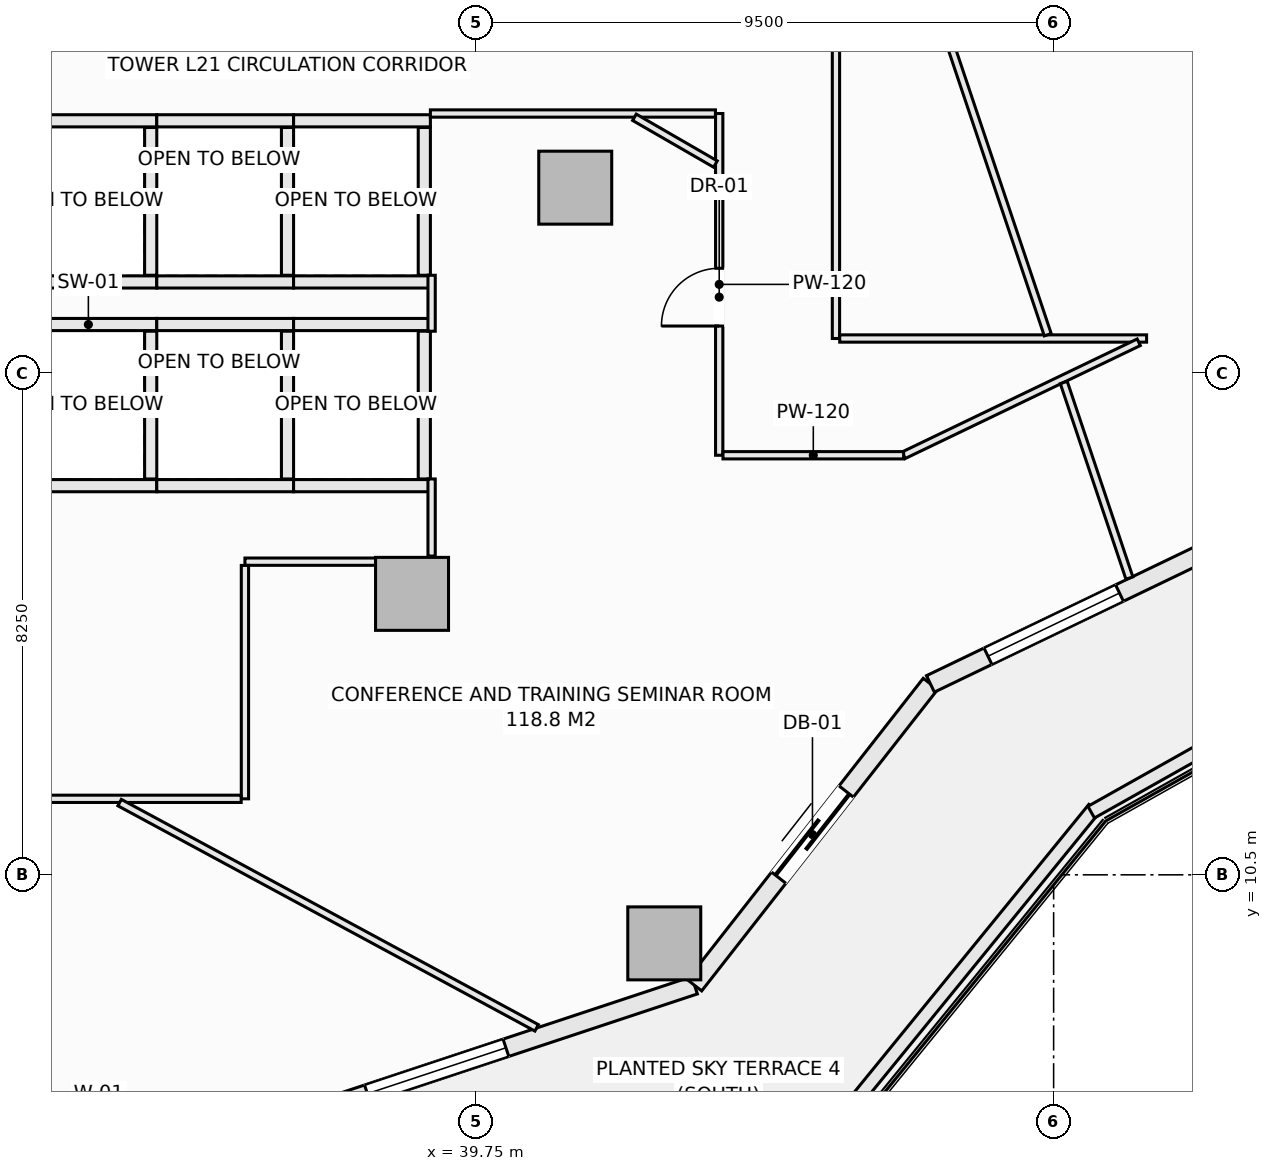
"""IFC4 building model, lengths in metres.
Left out: names, types, materials, properties, quantities, classifications, styles, units other than length and angle.
Written with IfcOpenShell. Run it as: python <this file> out.ifc"""

import sys

from ifc_helpers import new_model, si_unit, direction, frame, frame_2d, origin, origin_2d, place, context, subcontext, project, spatial, rectangle, extrude, element, fill, save


model = new_model("IFC4")
c1 = context("Model", 3, precision=1e-05, world=origin(), true_north=direction((0.0, 1.0)))
c2 = subcontext(c1, "Body", "Model", "MODEL_VIEW")
j1 = project(units=[si_unit("LENGTHUNIT", "METRE"), si_unit("PLANEANGLEUNIT", "RADIAN")], contexts=[c1])
p1 = place(None, origin())
s1 = spatial("IfcSite", under=j1, at=p1, CompositionType="ELEMENT")
p2 = place(p1, origin())
s2 = spatial("IfcBuilding", under=s1, at=p2, CompositionType="ELEMENT")
p3 = place(p2, frame((0.0, 0.0, 88.1)))
s3 = spatial("IfcBuildingStorey", under=s2, at=p3, CompositionType="ELEMENT", Elevation=88.1)
for number, where, z_axis, x_axis in (
    (1, (42.846, 9.373, -0.28), (0.0, 0.0, 1.0), (1.0, 0.0, 0.0)),
    (2, (38.698, 15.121, -0.28), (0.0, 0.0, 1.0), (1.0, 0.0, 0.0)),
    (3, (41.382, 21.801, -0.28), (0.0, 0.0, 1.0), (1.0, 0.0, 0.0)),
):
    element("IfcColumn", number, at=place(p3, frame(where, z_axis=z_axis, x_axis=x_axis)), inside=s3, PredefinedType="COLUMN", context=c2, shape_type="SweptSolid", body=[
        extrude(rectangle(XDim=1.2, YDim=1.2, at=origin_2d()), origin(), (0.0, 0.0, 1.0), 3.85),
    ])
p4 = place(p3, frame((36.968, 6.571, 0.0), z_axis=(0.0, 0.0, 1.0), x_axis=(0.949245153629, 0.314537181127, 0.0)))
e4 = element("IfcWall", 4, at=p4, inside=s3, PredefinedType="SOLIDWALL", context=c2, shape_type="SweptSolid", body=[
    extrude(rectangle(XDim=6.717, YDim=0.3, at=frame_2d((3.358, 0.0))), origin(), (0.0, 0.0, 1.0), 3.093),
])
p5 = place(p4, frame((1.05, 0.0, 0.85)))
e5 = element("IfcOpeningElement", 5, at=p5, cuts=e4, PredefinedType="OPENING", context=c2, shape_type="SweptSolid", body=[
    extrude(rectangle(XDim=2.4, YDim=1.9, at=frame_2d((1.2, 0.95))), frame((0.0, 0.16, 0.0), z_axis=(0.0, -1.0, 0.0), x_axis=(1.0, 0.0, 0.0)), (0.0, 0.0, 1.0), 0.32),
])
p6 = place(p3, frame((43.344, 8.684, 0.0), z_axis=(0.0, 0.0, 1.0), x_axis=(0.616434798832, 0.78740595552, 0.0)))
e6 = element("IfcWall", 6, at=p6, inside=s3, PredefinedType="SOLIDWALL", context=c2, shape_type="SweptSolid", body=[
    extrude(rectangle(XDim=6.294, YDim=0.3, at=frame_2d((3.147, 0.0))), origin(), (0.0, 0.0, 1.0), 3.093),
])
p7 = place(p6, frame((2.247, 0.0, 0.0)))
e7 = element("IfcOpeningElement", 7, at=p7, cuts=e6, PredefinedType="OPENING", context=c2, shape_type="SweptSolid", body=[
    extrude(rectangle(XDim=1.8, YDim=2.25, at=frame_2d((0.9, 1.125))), frame((0.0, 0.16, 0.0), z_axis=(0.0, -1.0, 0.0), x_axis=(1.0, 0.0, 0.0)), (0.0, 0.0, 1.0), 0.32),
])
p8 = place(p3, frame((47.224, 13.64, 0.0), z_axis=(0.0, 0.0, 1.0), x_axis=(0.901354747727, 0.433081538224, 0.0)))
e8 = element("IfcWall", 8, at=p8, inside=s3, PredefinedType="SOLIDWALL", context=c2, shape_type="SweptSolid", body=[
    extrude(rectangle(XDim=6.431, YDim=0.3, at=frame_2d((3.215, 0.0))), origin(), (0.0, 0.0, 1.0), 3.093),
])
p9 = place(p8, frame((1.05, 0.0, 0.85)))
e9 = element("IfcOpeningElement", 9, at=p9, cuts=e8, PredefinedType="OPENING", context=c2, shape_type="SweptSolid", body=[
    extrude(rectangle(XDim=2.4, YDim=1.9, at=frame_2d((1.2, 0.95))), frame((0.0, 0.16, 0.0), z_axis=(0.0, -1.0, 0.0), x_axis=(1.0, 0.0, 0.0)), (0.0, 0.0, 1.0), 0.32),
])
p10 = place(p3, frame((45.292, 5.918, 0.0), z_axis=(0.0, 0.0, 1.0), x_axis=(0.631819273026, 0.775115737315, 0.0)))
e10 = element("IfcWall", 10, at=p10, inside=s3, PredefinedType="PARAPET", context=c2, shape_type="SweptSolid", body=[
    extrude(rectangle(XDim=7.316, YDim=0.22, at=frame_2d((3.658, 0.0))), origin(), (0.0, 0.0, 1.0), 0.52),
])
p11 = place(p3, frame((49.868, 11.531, 0.0), z_axis=(0.0, 0.0, 1.0), x_axis=(0.871775109335, 0.489906275468, 0.0)))
e11 = element("IfcWall", 11, at=p11, inside=s3, PredefinedType="PARAPET", context=c2, shape_type="SweptSolid", body=[
    extrude(rectangle(XDim=7.152, YDim=0.22, at=frame_2d((3.576, 0.0))), origin(), (0.0, 0.0, 1.0), 0.52),
])
for number, where, z_axis, x_axis in (
    (12, (32.25, 19.55, 0.0), (0.0, 0.0, 1.0), (1.0, 0.0, 0.0)),
    (13, (32.25, 16.9, 0.0), (0.0, 0.0, 1.0), (1.0, 0.0, 0.0)),
):
    element("IfcWall", number, at=place(p3, frame(where, z_axis=z_axis, x_axis=x_axis)), inside=s3, PredefinedType="SOLIDWALL", context=c2, shape_type="SweptSolid", body=[
        extrude(rectangle(XDim=2.25, YDim=0.2, at=frame_2d((1.125, 0.0))), origin(), (0.0, 0.0, 1.0), 3.57),
    ])
p12 = place(p3, frame((34.4, 17.01, 0.0), z_axis=(0.0, 0.0, 1.0), x_axis=(0.0, 1.0, 0.0)))
e14 = element("IfcWall", 14, at=p12, inside=s3, PredefinedType="SOLIDWALL", context=c2, shape_type="SweptSolid", body=[
    extrude(rectangle(XDim=2.43, YDim=0.2, at=frame_2d((1.215, 0.0))), origin(), (0.0, 0.0, 1.0), 3.57),
])
for number, where, z_axis, x_axis in (
    (15, (34.5, 19.55, 0.0), (0.0, 0.0, 1.0), (1.0, 0.0, 0.0)),
    (16, (34.5, 16.9, 0.0), (0.0, 0.0, 1.0), (1.0, 0.0, 0.0)),
):
    element("IfcWall", number, at=place(p3, frame(where, z_axis=z_axis, x_axis=x_axis)), inside=s3, PredefinedType="SOLIDWALL", context=c2, shape_type="SweptSolid", body=[
        extrude(rectangle(XDim=2.25, YDim=0.2, at=frame_2d((1.125, 0.0))), origin(), (0.0, 0.0, 1.0), 3.57),
    ])
p13 = place(p3, frame((36.65, 17.01, 0.0), z_axis=(0.0, 0.0, 1.0), x_axis=(0.0, 1.0, 0.0)))
e17 = element("IfcWall", 17, at=p13, inside=s3, PredefinedType="SOLIDWALL", context=c2, shape_type="SweptSolid", body=[
    extrude(rectangle(XDim=2.43, YDim=0.2, at=frame_2d((1.215, 0.0))), origin(), (0.0, 0.0, 1.0), 3.57),
])
for number, where, z_axis, x_axis in (
    (18, (36.75, 19.55, 0.0), (0.0, 0.0, 1.0), (1.0, 0.0, 0.0)),
    (19, (36.75, 16.9, 0.0), (0.0, 0.0, 1.0), (1.0, 0.0, 0.0)),
):
    element("IfcWall", number, at=place(p3, frame(where, z_axis=z_axis, x_axis=x_axis)), inside=s3, PredefinedType="SOLIDWALL", context=c2, shape_type="SweptSolid", body=[
        extrude(rectangle(XDim=2.25, YDim=0.2, at=frame_2d((1.125, 0.0))), origin(), (0.0, 0.0, 1.0), 3.57),
    ])
p14 = place(p3, frame((38.9, 17.01, 0.0), z_axis=(0.0, 0.0, 1.0), x_axis=(0.0, 1.0, 0.0)))
e20 = element("IfcWall", 20, at=p14, inside=s3, PredefinedType="SOLIDWALL", context=c2, shape_type="SweptSolid", body=[
    extrude(rectangle(XDim=2.43, YDim=0.2, at=frame_2d((1.215, 0.0))), origin(), (0.0, 0.0, 1.0), 3.57),
])
for number, where, z_axis, x_axis in (
    (21, (32.25, 22.9, 0.0), (0.0, 0.0, 1.0), (1.0, 0.0, 0.0)),
    (22, (32.25, 20.25, 0.0), (0.0, 0.0, 1.0), (1.0, 0.0, 0.0)),
):
    element("IfcWall", number, at=place(p3, frame(where, z_axis=z_axis, x_axis=x_axis)), inside=s3, PredefinedType="SOLIDWALL", context=c2, shape_type="SweptSolid", body=[
        extrude(rectangle(XDim=2.25, YDim=0.2, at=frame_2d((1.125, 0.0))), origin(), (0.0, 0.0, 1.0), 3.57),
    ])
p15 = place(p3, frame((34.4, 20.36, 0.0), z_axis=(0.0, 0.0, 1.0), x_axis=(0.0, 1.0, 0.0)))
e23 = element("IfcWall", 23, at=p15, inside=s3, PredefinedType="SOLIDWALL", context=c2, shape_type="SweptSolid", body=[
    extrude(rectangle(XDim=2.43, YDim=0.2, at=frame_2d((1.215, 0.0))), origin(), (0.0, 0.0, 1.0), 3.57),
])
for number, where, z_axis, x_axis in (
    (24, (34.5, 22.9, 0.0), (0.0, 0.0, 1.0), (1.0, 0.0, 0.0)),
    (25, (34.5, 20.25, 0.0), (0.0, 0.0, 1.0), (1.0, 0.0, 0.0)),
):
    element("IfcWall", number, at=place(p3, frame(where, z_axis=z_axis, x_axis=x_axis)), inside=s3, PredefinedType="SOLIDWALL", context=c2, shape_type="SweptSolid", body=[
        extrude(rectangle(XDim=2.25, YDim=0.2, at=frame_2d((1.125, 0.0))), origin(), (0.0, 0.0, 1.0), 3.57),
    ])
p16 = place(p3, frame((36.65, 20.36, 0.0), z_axis=(0.0, 0.0, 1.0), x_axis=(0.0, 1.0, 0.0)))
e26 = element("IfcWall", 26, at=p16, inside=s3, PredefinedType="SOLIDWALL", context=c2, shape_type="SweptSolid", body=[
    extrude(rectangle(XDim=2.43, YDim=0.2, at=frame_2d((1.215, 0.0))), origin(), (0.0, 0.0, 1.0), 3.57),
])
for number, where, z_axis, x_axis in (
    (27, (36.75, 22.9, 0.0), (0.0, 0.0, 1.0), (1.0, 0.0, 0.0)),
    (28, (36.75, 20.25, 0.0), (0.0, 0.0, 1.0), (1.0, 0.0, 0.0)),
):
    element("IfcWall", number, at=place(p3, frame(where, z_axis=z_axis, x_axis=x_axis)), inside=s3, PredefinedType="SOLIDWALL", context=c2, shape_type="SweptSolid", body=[
        extrude(rectangle(XDim=2.25, YDim=0.2, at=frame_2d((1.125, 0.0))), origin(), (0.0, 0.0, 1.0), 3.57),
    ])
p17 = place(p3, frame((38.9, 20.36, 0.0), z_axis=(0.0, 0.0, 1.0), x_axis=(0.0, 1.0, 0.0)))
e29 = element("IfcWall", 29, at=p17, inside=s3, PredefinedType="SOLIDWALL", context=c2, shape_type="SweptSolid", body=[
    extrude(rectangle(XDim=2.43, YDim=0.2, at=frame_2d((1.215, 0.0))), origin(), (0.0, 0.0, 1.0), 3.57),
])
p18 = place(p3, frame((35.95, 15.65, 0.0), z_axis=(0.0, 0.0, 1.0), x_axis=(1.0, 0.0, 0.0)))
e30 = element("IfcWall", 30, at=p18, inside=s3, PredefinedType="PARTITIONING", context=c2, shape_type="SweptSolid", body=[
    extrude(rectangle(XDim=2.291, YDim=0.12, at=frame_2d((1.146, 0.0))), origin(), (0.0, 0.0, 1.0), 3.57),
])
p19 = place(p3, frame((35.95, 11.75, 0.0), z_axis=(0.0, 0.0, 1.0), x_axis=(0.0, 1.0, 0.0)))
e31 = element("IfcWall", 31, at=p19, inside=s3, PredefinedType="PARTITIONING", context=c2, shape_type="SweptSolid", body=[
    extrude(rectangle(XDim=3.838, YDim=0.12, at=frame_2d((1.919, 0.0))), origin(), (0.0, 0.0, 1.0), 3.57),
])
p20 = place(p3, frame((27.242, 11.75, 0.0), z_axis=(0.0, 0.0, 1.0), x_axis=(1.0, 0.0, 0.0)))
e32 = element("IfcWall", 32, at=p20, inside=s3, PredefinedType="PARTITIONING", context=c2, shape_type="SweptSolid", body=[
    extrude(rectangle(XDim=8.646, YDim=0.12, at=frame_2d((4.323, 0.0))), origin(), (0.0, 0.0, 1.0), 3.57),
])
p21 = place(p20, frame((3.186, 0.0, 0.0)))
e33 = element("IfcOpeningElement", 33, at=p21, cuts=e32, PredefinedType="OPENING", context=c2, shape_type="SweptSolid", body=[
    extrude(rectangle(XDim=0.95, YDim=2.1, at=frame_2d((0.475, 1.05))), frame((0.0, 0.07, 0.0), z_axis=(0.0, -1.0, 0.0), x_axis=(1.0, 0.0, 0.0)), (0.0, 0.0, 1.0), 0.14),
])
p22 = place(p3, frame((43.75, 17.4, 0.0), z_axis=(0.0, 0.0, 1.0), x_axis=(0.0, 1.0, 0.0)))
e34 = element("IfcWall", 34, at=p22, inside=s3, PredefinedType="PARTITIONING", context=c2, shape_type="SweptSolid", body=[
    extrude(rectangle(XDim=5.62, YDim=0.12, at=frame_2d((2.81, 0.0))), origin(), (0.0, 0.0, 1.0), 3.57),
])
p23 = place(p22, frame((2.125, 0.0, 0.0)))
e35 = element("IfcOpeningElement", 35, at=p23, cuts=e34, PredefinedType="OPENING", context=c2, shape_type="SweptSolid", body=[
    extrude(rectangle(XDim=0.95, YDim=2.1, at=frame_2d((0.475, 1.05))), frame((0.0, 0.07, 0.0), z_axis=(0.0, -1.0, 0.0), x_axis=(1.0, 0.0, 0.0)), (0.0, 0.0, 1.0), 0.14),
])
p24 = place(p3, frame((45.67, 19.32, 0.0), z_axis=(0.0, 0.0, 1.0), x_axis=(0.0, 1.0, 0.0)))
e36 = element("IfcWall", 36, at=p24, inside=s3, PredefinedType="PARTITIONING", context=c2, shape_type="SweptSolid", body=[
    extrude(rectangle(XDim=14.798, YDim=0.12, at=frame_2d((7.399, 0.0))), origin(), (0.0, 0.0, 1.0), 3.57),
])
p25 = place(p24, frame((11.458, 0.0, 0.0)))
e37 = element("IfcOpeningElement", 37, at=p25, cuts=e36, PredefinedType="OPENING", context=c2, shape_type="SweptSolid", body=[
    extrude(rectangle(XDim=0.95, YDim=2.1, at=frame_2d((0.475, 1.05))), frame((0.0, 0.07, 0.0), z_axis=(0.0, -1.0, 0.0), x_axis=(1.0, 0.0, 0.0)), (0.0, 0.0, 1.0), 0.14),
])
p26 = place(p3, frame((45.732, 19.32, 0.0), z_axis=(0.0, 0.0, 1.0), x_axis=(1.0, 0.0, 0.0)))
e38 = element("IfcWall", 38, at=p26, inside=s3, PredefinedType="PARTITIONING", context=c2, shape_type="SweptSolid", body=[
    extrude(rectangle(XDim=5.047, YDim=0.12, at=frame_2d((2.523, 0.0))), origin(), (0.0, 0.0, 1.0), 3.205),
])
p27 = place(p3, frame((46.783, 17.4, 0.0), z_axis=(0.0, 0.0, 1.0), x_axis=(0.901339159108, 0.433113980679, 0.0)))
e39 = element("IfcWall", 39, at=p27, inside=s3, PredefinedType="PARTITIONING", context=c2, shape_type="SweptSolid", body=[
    extrude(rectangle(XDim=4.29, YDim=0.12, at=frame_2d((2.145, 0.0))), origin(), (0.0, 0.0, 1.0), 3.57),
])
p28 = place(p3, frame((43.812, 17.4, 0.0), z_axis=(0.0, 0.0, 1.0), x_axis=(1.0, 0.0, 0.0)))
e40 = element("IfcWall", 40, at=p28, inside=s3, PredefinedType="PARTITIONING", context=c2, shape_type="SweptSolid", body=[
    extrude(rectangle(XDim=2.971, YDim=0.12, at=frame_2d((1.485, 0.0))), origin(), (0.0, 0.0, 1.0), 3.57),
])
p29 = place(p3, frame((39.0, 23.02, 0.0), z_axis=(0.0, 0.0, 1.0), x_axis=(1.0, 0.0, 0.0)))
e41 = element("IfcWall", 41, at=p29, inside=s3, PredefinedType="PARTITIONING", context=c2, shape_type="SweptSolid", body=[
    extrude(rectangle(XDim=4.688, YDim=0.12, at=frame_2d((2.344, 0.0))), origin(), (0.0, 0.0, 1.0), 3.57),
])
p30 = place(p3, frame((39.02, 15.742, 0.0), z_axis=(0.0, 0.0, 1.0), x_axis=(0.0, 1.0, 0.0)))
e42 = element("IfcWall", 42, at=p30, inside=s3, PredefinedType="PARTITIONING", context=c2, shape_type="SweptSolid", body=[
    extrude(rectangle(XDim=1.268, YDim=0.12, at=frame_2d((0.634, 0.0))), origin(), (0.0, 0.0, 1.0), 2.934),
])
p31 = place(p3, frame((39.02, 19.44, 0.0), z_axis=(0.0, 0.0, 1.0), x_axis=(0.0, 1.0, 0.0)))
e43 = element("IfcWall", 43, at=p31, inside=s3, PredefinedType="PARTITIONING", context=c2, shape_type="SweptSolid", body=[
    extrude(rectangle(XDim=0.92, YDim=0.12, at=frame_2d((0.46, 0.0))), origin(), (0.0, 0.0, 1.0), 3.57),
])
p32 = place(p3, frame((33.889, 11.688, 0.0), z_axis=(0.0, 0.0, 1.0), x_axis=(0.879862970093, -0.475227475909, 0.0)))
e44 = element("IfcWall", 44, at=p32, inside=s3, PredefinedType="PARTITIONING", context=c2, shape_type="SweptSolid", body=[
    extrude(rectangle(XDim=7.795, YDim=0.12, at=frame_2d((3.898, 0.0))), origin(), (0.0, 0.0, 1.0), 3.57),
])
p33 = place(p3, frame((42.355, 22.958, 0.0), z_axis=(0.0, 0.0, 1.0), x_axis=(0.866037617598, -0.499978844458, 0.0)))
e45 = element("IfcWall", 45, at=p33, inside=s3, PredefinedType="PARTITIONING", context=c2, shape_type="SweptSolid", body=[
    extrude(rectangle(XDim=1.539, YDim=0.12, at=frame_2d((0.769, 0.0))), origin(), (0.0, 0.0, 1.0), 3.57),
])
p34 = place(p3, frame((45.732, 29.579, 0.0), z_axis=(0.0, 0.0, 1.0), x_axis=(0.318099793934, -0.948057235139, 0.0)))
e46 = element("IfcWall", 46, at=p34, inside=s3, PredefinedType="PARTITIONING", context=c2, shape_type="SweptSolid", body=[
    extrude(rectangle(XDim=10.756, YDim=0.12, at=frame_2d((5.378, 0.0))), origin(), (0.0, 0.0, 1.0), 3.57),
])
p35 = place(p3, frame((49.417, 18.597, 0.0), z_axis=(0.0, 0.0, 1.0), x_axis=(0.318105552227, -0.948055303051, 0.0)))
e47 = element("IfcWall", 47, at=p35, inside=s3, PredefinedType="PARTITIONING", context=c2, shape_type="SweptSolid", body=[
    extrude(rectangle(XDim=3.392, YDim=0.12, at=frame_2d((1.696, 0.0))), origin(), (0.0, 0.0, 1.0), 3.57),
])
p36 = place(p5, origin())
e48 = element("IfcWindow", 48, at=p36, inside=s3, PartitioningType="SINGLE_PANEL", PredefinedType="WINDOW", context=c2, shape_type="SweptSolid", body=[
    extrude(rectangle(XDim=2.4, YDim=1.9, at=frame_2d((1.2, 0.95))), frame((0.0, 0.03, 0.0), z_axis=(0.0, -1.0, 0.0), x_axis=(1.0, 0.0, 0.0)), (0.0, 0.0, 1.0), 0.06),
])
fill(e5, e48)
p37 = place(p7, frame((1.8, 0.0, 0.0), z_axis=(0.0, 0.0, 1.0), x_axis=(-1.0, 0.0, 0.0)))
e49 = element("IfcDoor", 49, at=p37, inside=s3, OperationType="SLIDING_TO_LEFT", PredefinedType="DOOR", context=c2, shape_type="SweptSolid", body=[
    extrude(rectangle(XDim=1.8, YDim=2.25, at=frame_2d((0.9, 1.125))), frame((0.0, 0.025, 0.0), z_axis=(0.0, -1.0, 0.0), x_axis=(1.0, 0.0, 0.0)), (0.0, 0.0, 1.0), 0.05),
])
fill(e7, e49)
p38 = place(p9, origin())
e50 = element("IfcWindow", 50, at=p38, inside=s3, PartitioningType="SINGLE_PANEL", PredefinedType="WINDOW", context=c2, shape_type="SweptSolid", body=[
    extrude(rectangle(XDim=2.4, YDim=1.9, at=frame_2d((1.2, 0.95))), frame((0.0, 0.03, 0.0), z_axis=(0.0, -1.0, 0.0), x_axis=(1.0, 0.0, 0.0)), (0.0, 0.0, 1.0), 0.06),
])
fill(e9, e50)
p39 = place(p23, origin())
e51 = element("IfcDoor", 51, at=p39, inside=s3, OperationType="SINGLE_SWING_LEFT", PredefinedType="DOOR", context=c2, shape_type="SweptSolid", body=[
    extrude(rectangle(XDim=0.95, YDim=2.1, at=frame_2d((0.475, 1.05))), frame((0.0, 0.025, 0.0), z_axis=(0.0, -1.0, 0.0), x_axis=(1.0, 0.0, 0.0)), (0.0, 0.0, 1.0), 0.05),
])
fill(e35, e51)
save(model, sys.argv[1])
